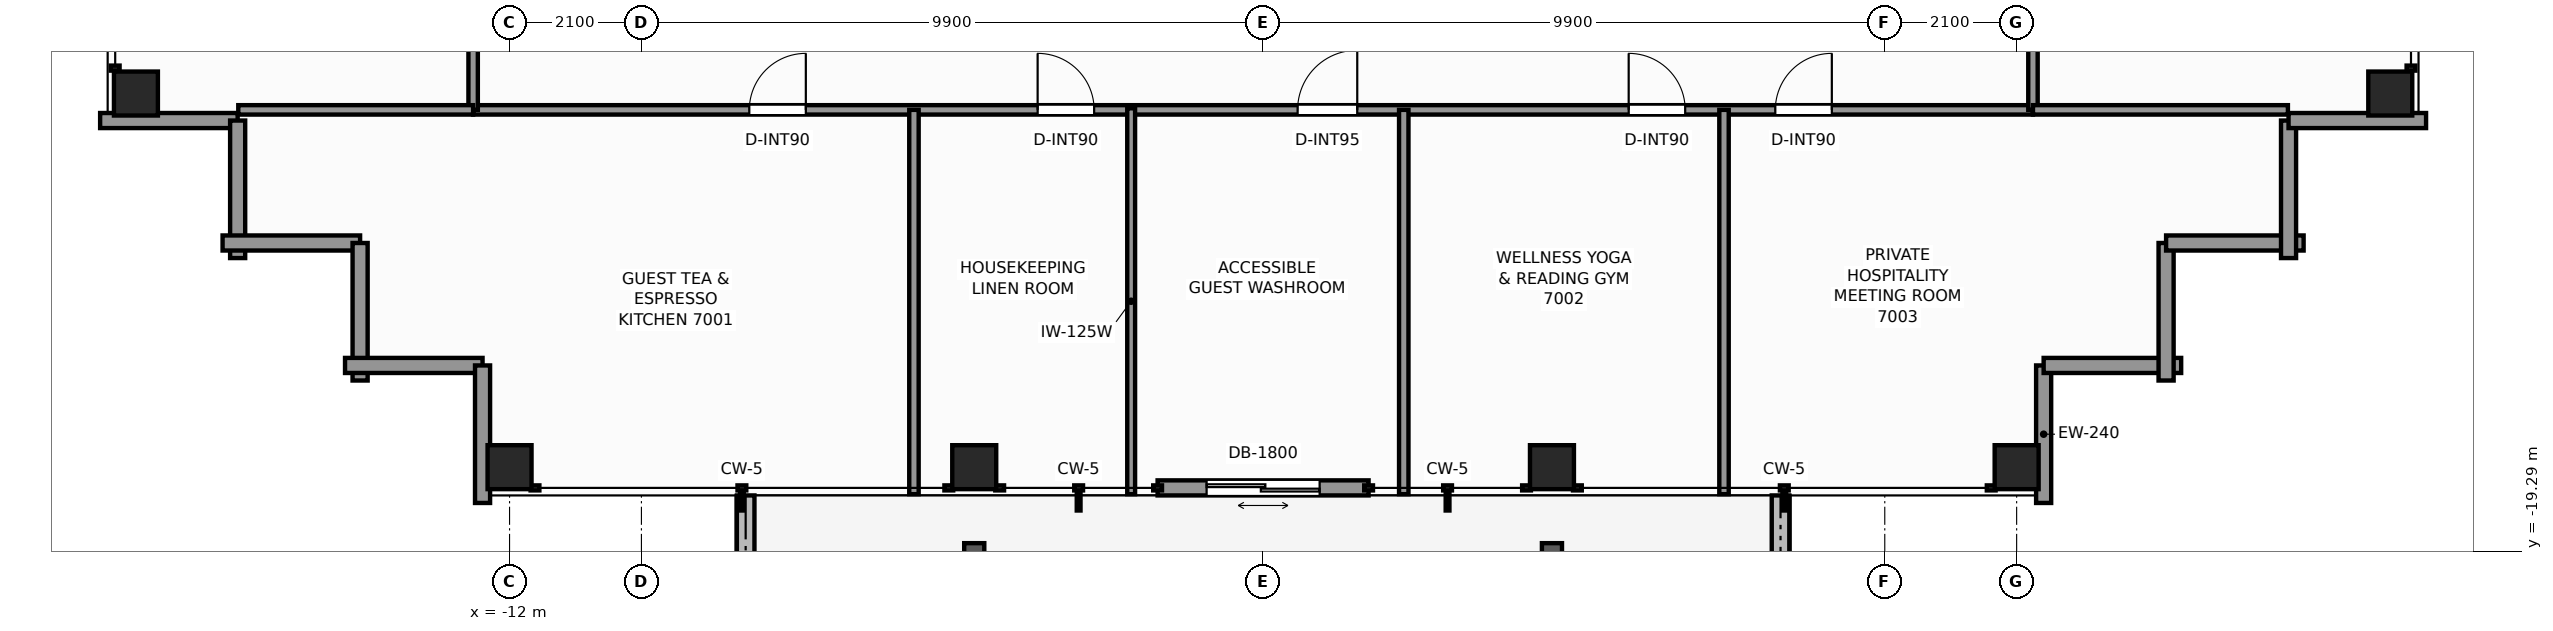
"""IFC4 building model, lengths in metres.
Left out: names, types, materials, properties, quantities, classifications, styles, units other than length and angle.
Written with IfcOpenShell. Run it as: python <this file> out.ifc"""

import sys

from ifc_helpers import new_model, si_unit, direction, frame, frame_2d, origin, origin_2d, place, context, subcontext, project, spatial, rectangle, extrude, element, fill, save


model = new_model("IFC4")
c1 = context("Model", 3, precision=1e-05, world=origin(), true_north=direction((0.0, 1.0)))
c2 = subcontext(c1, "Body", "Model", "MODEL_VIEW")
j1 = project(units=[si_unit("LENGTHUNIT", "METRE"), si_unit("PLANEANGLEUNIT", "RADIAN")], contexts=[c1])
p1 = place(None, origin())
s1 = spatial("IfcSite", under=j1, at=p1, CompositionType="ELEMENT")
p2 = place(p1, origin())
s2 = spatial("IfcBuilding", under=s1, at=p2, CompositionType="ELEMENT")
p3 = place(p2, frame((0.0, 0.0, 240.9)))
s3 = spatial("IfcBuildingStorey", under=s2, at=p3, CompositionType="ELEMENT", Elevation=240.9)
for number, where, z_axis, x_axis in (
    (1, (-12.0, -17.95, 0.0), (0.0, 0.0, 1.0), (1.0, 0.0, 0.0)),
    (2, (-4.6, -17.95, 0.0), (0.0, 0.0, 1.0), (1.0, 0.0, 0.0)),
    (3, (4.6, -17.95, 0.0), (0.0, 0.0, 1.0), (1.0, 0.0, 0.0)),
    (4, (12.0, -17.95, 0.0), (0.0, 0.0, 1.0), (1.0, 0.0, 0.0)),
    (5, (-17.95, -12.0, 0.0), (0.0, 0.0, 1.0), (1.0, 0.0, 0.0)),
    (6, (17.95, -12.0, 0.0), (0.0, 0.0, 1.0), (1.0, 0.0, 0.0)),
):
    element("IfcColumn", number, at=place(p3, frame(where, z_axis=z_axis, x_axis=x_axis)), inside=s3, PredefinedType="COLUMN", context=c2, shape_type="SweptSolid", body=[
        extrude(rectangle(XDim=0.7, YDim=0.7, at=origin_2d()), origin(), (0.0, 0.0, 1.0), 3.5),
    ])
p4 = place(p3, frame((8.24, -21.074, -0.07), z_axis=(0.0, 0.0, 1.0), x_axis=(0.0, 1.0, 0.0)))
e7 = element("IfcWall", 7, at=p4, inside=s3, PredefinedType="PARAPET", context=c2, shape_type="SweptSolid", body=[
    extrude(rectangle(XDim=2.674, YDim=0.28, at=frame_2d((1.337, 0.0))), origin(), (0.0, 0.0, 1.0), 0.42),
])
p5 = place(p3, frame((-8.24, -18.4, -0.07), z_axis=(0.0, 0.0, 1.0), x_axis=(0.0, -1.0, 0.0)))
e8 = element("IfcWall", 8, at=p5, inside=s3, PredefinedType="PARAPET", context=c2, shape_type="SweptSolid", body=[
    extrude(rectangle(XDim=3.42, YDim=0.28, at=frame_2d((1.71, 0.0))), origin(), (0.0, 0.0, 1.0), 0.42),
])
p6 = place(p3, frame((1.68, -18.28, 0.0), z_axis=(0.0, 0.0, 1.0), x_axis=(-1.0, 0.0, 0.0)))
e9 = element("IfcWall", 9, at=p6, inside=s3, PredefinedType="STANDARD", context=c2, shape_type="SweptSolid", body=[
    extrude(rectangle(XDim=3.36, YDim=0.24, at=frame_2d((1.68, 0.0))), origin(), (0.0, 0.0, 1.0), 3.25),
])
p7 = place(p6, frame((0.78, 0.0, 0.0)))
e10 = element("IfcOpeningElement", 10, at=p7, cuts=e9, PredefinedType="OPENING", context=c2, shape_type="SweptSolid", body=[
    extrude(rectangle(XDim=1.8, YDim=2.2, at=frame_2d((0.9, 1.1))), frame((0.0, 0.13, 0.0), z_axis=(0.0, -1.0, 0.0), x_axis=(1.0, 0.0, 0.0)), (0.0, 0.0, 1.0), 0.26),
])
p8 = place(p3, frame((12.43, -16.33, 0.0), z_axis=(0.0, 0.0, 1.0), x_axis=(0.0, -1.0, 0.0)))
e11 = element("IfcWall", 11, at=p8, inside=s3, PredefinedType="STANDARD", context=c2, shape_type="SweptSolid", body=[
    extrude(rectangle(XDim=2.19, YDim=0.24, at=frame_2d((1.095, 0.0))), origin(), (0.0, 0.0, 1.0), 2.633),
])
for number, where, z_axis, x_axis in (
    (12, (14.62, -16.33, 0.0), (0.0, 0.0, 1.0), (-1.0, 0.0, 0.0)),
    (13, (14.38, -14.38, 0.0), (0.0, 0.0, 1.0), (0.0, -1.0, 0.0)),
    (14, (16.57, -14.38, 0.0), (0.0, 0.0, 1.0), (-1.0, 0.0, 0.0)),
    (15, (16.33, -12.43, 0.0), (0.0, 0.0, 1.0), (0.0, -1.0, 0.0)),
):
    element("IfcWall", number, at=place(p3, frame(where, z_axis=z_axis, x_axis=x_axis)), inside=s3, PredefinedType="STANDARD", context=c2, shape_type="SweptSolid", body=[
        extrude(rectangle(XDim=2.19, YDim=0.24, at=frame_2d((1.095, 0.0))), origin(), (0.0, 0.0, 1.0), 2.633),
    ])
for number, where, z_axis, x_axis in (
    (16, (18.52, -12.43, 0.0), (0.0, 0.0, 1.0), (-1.0, 0.0, 0.0)),
    (17, (-16.33, -12.43, 0.0), (0.0, 0.0, 1.0), (-1.0, 0.0, 0.0)),
):
    element("IfcWall", number, at=place(p3, frame(where, z_axis=z_axis, x_axis=x_axis)), inside=s3, PredefinedType="STANDARD", context=c2, shape_type="SweptSolid", body=[
        extrude(rectangle(XDim=2.19, YDim=0.24, at=frame_2d((1.095, 0.0))), origin(), (0.0, 0.0, 1.0), 2.633),
    ])
for number, where, z_axis, x_axis in (
    (18, (-16.33, -14.62, 0.0), (0.0, 0.0, 1.0), (0.0, 1.0, 0.0)),
    (19, (-14.38, -14.38, 0.0), (0.0, 0.0, 1.0), (-1.0, 0.0, 0.0)),
    (20, (-14.38, -16.57, 0.0), (0.0, 0.0, 1.0), (0.0, 1.0, 0.0)),
    (21, (-12.43, -16.33, 0.0), (0.0, 0.0, 1.0), (-1.0, 0.0, 0.0)),
):
    element("IfcWall", number, at=place(p3, frame(where, z_axis=z_axis, x_axis=x_axis)), inside=s3, PredefinedType="STANDARD", context=c2, shape_type="SweptSolid", body=[
        extrude(rectangle(XDim=2.19, YDim=0.24, at=frame_2d((1.095, 0.0))), origin(), (0.0, 0.0, 1.0), 2.633),
    ])
p9 = place(p3, frame((-12.43, -18.52, 0.0), z_axis=(0.0, 0.0, 1.0), x_axis=(0.0, 1.0, 0.0)))
e22 = element("IfcWall", 22, at=p9, inside=s3, PredefinedType="STANDARD", context=c2, shape_type="SweptSolid", body=[
    extrude(rectangle(XDim=2.19, YDim=0.24, at=frame_2d((1.095, 0.0))), origin(), (0.0, 0.0, 1.0), 2.633),
])
p10 = place(p3, frame((-12.58, -12.26, 0.0), z_axis=(0.0, 0.0, 1.0), x_axis=(1.0, 0.0, 0.0)))
e23 = element("IfcWall", 23, at=p10, inside=s3, PredefinedType="PARTITIONING", context=c2, shape_type="SweptSolid", body=[
    extrude(rectangle(XDim=24.84, YDim=0.15, at=frame_2d((12.42, 0.0))), origin(), (0.0, 0.0, 1.0), 2.539),
])
p11 = place(p10, frame((4.398, 0.0, 0.0)))
e24 = element("IfcOpeningElement", 24, at=p11, cuts=e23, PredefinedType="OPENING", context=c2, shape_type="SweptSolid", body=[
    extrude(rectangle(XDim=0.9, YDim=2.06, at=frame_2d((0.45, 1.03))), frame((0.0, 0.085, 0.0), z_axis=(0.0, -1.0, 0.0), x_axis=(1.0, 0.0, 0.0)), (0.0, 0.0, 1.0), 0.17),
])
p12 = place(p10, frame((8.99, 0.0, 0.0)))
e25 = element("IfcOpeningElement", 25, at=p12, cuts=e23, PredefinedType="OPENING", context=c2, shape_type="SweptSolid", body=[
    extrude(rectangle(XDim=0.9, YDim=2.06, at=frame_2d((0.45, 1.03))), frame((0.0, 0.085, 0.0), z_axis=(0.0, -1.0, 0.0), x_axis=(1.0, 0.0, 0.0)), (0.0, 0.0, 1.0), 0.17),
])
p13 = place(p10, frame((13.129, 0.0, 0.0)))
e26 = element("IfcOpeningElement", 26, at=p13, cuts=e23, PredefinedType="OPENING", context=c2, shape_type="SweptSolid", body=[
    extrude(rectangle(XDim=0.95, YDim=2.06, at=frame_2d((0.475, 1.03))), frame((0.0, 0.085, 0.0), z_axis=(0.0, -1.0, 0.0), x_axis=(1.0, 0.0, 0.0)), (0.0, 0.0, 1.0), 0.17),
])
p14 = place(p10, frame((18.402, 0.0, 0.0)))
e27 = element("IfcOpeningElement", 27, at=p14, cuts=e23, PredefinedType="OPENING", context=c2, shape_type="SweptSolid", body=[
    extrude(rectangle(XDim=0.9, YDim=2.06, at=frame_2d((0.45, 1.03))), frame((0.0, 0.085, 0.0), z_axis=(0.0, -1.0, 0.0), x_axis=(1.0, 0.0, 0.0)), (0.0, 0.0, 1.0), 0.17),
])
p15 = place(p10, frame((20.737, 0.0, 0.0)))
e28 = element("IfcOpeningElement", 28, at=p15, cuts=e23, PredefinedType="OPENING", context=c2, shape_type="SweptSolid", body=[
    extrude(rectangle(XDim=0.9, YDim=2.06, at=frame_2d((0.45, 1.03))), frame((0.0, 0.085, 0.0), z_axis=(0.0, -1.0, 0.0), x_axis=(1.0, 0.0, 0.0)), (0.0, 0.0, 1.0), 0.17),
])
p16 = place(p3, frame((-12.58, -12.26, 0.0), z_axis=(0.0, 0.0, 1.0), x_axis=(0.0, 1.0, 0.0)))
e29 = element("IfcWall", 29, at=p16, inside=s3, PredefinedType="PARTITIONING", context=c2, shape_type="SweptSolid", body=[
    extrude(rectangle(XDim=24.84, YDim=0.15, at=frame_2d((12.42, 0.0))), origin(), (0.0, 0.0, 1.0), 2.539),
])
p17 = place(p16, frame((2.686, 0.0, 0.0)))
e30 = element("IfcOpeningElement", 30, at=p17, cuts=e29, PredefinedType="OPENING", context=c2, shape_type="SweptSolid", body=[
    extrude(rectangle(XDim=0.9, YDim=2.06, at=frame_2d((0.45, 1.03))), frame((0.0, 0.085, 0.0), z_axis=(0.0, -1.0, 0.0), x_axis=(1.0, 0.0, 0.0)), (0.0, 0.0, 1.0), 0.17),
])
p18 = place(p16, frame((4.385, 0.0, 0.0)))
e31 = element("IfcOpeningElement", 31, at=p18, cuts=e29, PredefinedType="OPENING", context=c2, shape_type="SweptSolid", body=[
    extrude(rectangle(XDim=0.95, YDim=2.06, at=frame_2d((0.475, 1.03))), frame((0.0, 0.085, 0.0), z_axis=(0.0, -1.0, 0.0), x_axis=(1.0, 0.0, 0.0)), (0.0, 0.0, 1.0), 0.17),
])
p19 = place(p16, frame((13.796, 0.0, 0.0)))
e32 = element("IfcOpeningElement", 32, at=p19, cuts=e29, PredefinedType="OPENING", context=c2, shape_type="SweptSolid", body=[
    extrude(rectangle(XDim=0.95, YDim=2.06, at=frame_2d((0.475, 1.03))), frame((0.0, 0.085, 0.0), z_axis=(0.0, -1.0, 0.0), x_axis=(1.0, 0.0, 0.0)), (0.0, 0.0, 1.0), 0.17),
])
p20 = place(p16, frame((18.242, 0.0, 0.0)))
e33 = element("IfcOpeningElement", 33, at=p20, cuts=e29, PredefinedType="OPENING", context=c2, shape_type="SweptSolid", body=[
    extrude(rectangle(XDim=0.9, YDim=2.06, at=frame_2d((0.45, 1.03))), frame((0.0, 0.085, 0.0), z_axis=(0.0, -1.0, 0.0), x_axis=(1.0, 0.0, 0.0)), (0.0, 0.0, 1.0), 0.17),
])
p21 = place(p16, frame((20.059, 0.0, 0.0)))
e34 = element("IfcOpeningElement", 34, at=p21, cuts=e29, PredefinedType="OPENING", context=c2, shape_type="SweptSolid", body=[
    extrude(rectangle(XDim=0.95, YDim=2.06, at=frame_2d((0.475, 1.03))), frame((0.0, 0.085, 0.0), z_axis=(0.0, -1.0, 0.0), x_axis=(1.0, 0.0, 0.0)), (0.0, 0.0, 1.0), 0.17),
])
p22 = place(p3, frame((12.26, -12.26, 0.0), z_axis=(0.0, 0.0, 1.0), x_axis=(0.0, 1.0, 0.0)))
e35 = element("IfcWall", 35, at=p22, inside=s3, PredefinedType="PARTITIONING", context=c2, shape_type="SweptSolid", body=[
    extrude(rectangle(XDim=24.84, YDim=0.15, at=frame_2d((12.42, 0.0))), origin(), (0.0, 0.0, 1.0), 2.539),
])
p23 = place(p22, frame((4.275, 0.0, 0.0)))
e36 = element("IfcOpeningElement", 36, at=p23, cuts=e35, PredefinedType="OPENING", context=c2, shape_type="SweptSolid", body=[
    extrude(rectangle(XDim=0.9, YDim=2.06, at=frame_2d((0.45, 1.03))), frame((0.0, 0.085, 0.0), z_axis=(0.0, -1.0, 0.0), x_axis=(1.0, 0.0, 0.0)), (0.0, 0.0, 1.0), 0.17),
])
p24 = place(p22, frame((9.966, 0.0, 0.0)))
e37 = element("IfcOpeningElement", 37, at=p24, cuts=e35, PredefinedType="OPENING", context=c2, shape_type="SweptSolid", body=[
    extrude(rectangle(XDim=0.95, YDim=2.06, at=frame_2d((0.475, 1.03))), frame((0.0, 0.085, 0.0), z_axis=(0.0, -1.0, 0.0), x_axis=(1.0, 0.0, 0.0)), (0.0, 0.0, 1.0), 0.17),
])
p25 = place(p22, frame((18.653, 0.0, 0.0)))
e38 = element("IfcOpeningElement", 38, at=p25, cuts=e35, PredefinedType="OPENING", context=c2, shape_type="SweptSolid", body=[
    extrude(rectangle(XDim=0.95, YDim=2.06, at=frame_2d((0.475, 1.03))), frame((0.0, 0.085, 0.0), z_axis=(0.0, -1.0, 0.0), x_axis=(1.0, 0.0, 0.0)), (0.0, 0.0, 1.0), 0.17),
])
p26 = place(p22, frame((20.836, 0.0, 0.0)))
e39 = element("IfcOpeningElement", 39, at=p26, cuts=e35, PredefinedType="OPENING", context=c2, shape_type="SweptSolid", body=[
    extrude(rectangle(XDim=0.9, YDim=2.06, at=frame_2d((0.45, 1.03))), frame((0.0, 0.085, 0.0), z_axis=(0.0, -1.0, 0.0), x_axis=(1.0, 0.0, 0.0)), (0.0, 0.0, 1.0), 0.17),
])
p27 = place(p3, frame((-16.32, -12.26, 0.0), z_axis=(0.0, 0.0, 1.0), x_axis=(1.0, 0.0, 0.0)))
e40 = element("IfcWall", 40, at=p27, inside=s3, PredefinedType="PARTITIONING", context=c2, shape_type="SweptSolid", body=[
    extrude(rectangle(XDim=3.74, YDim=0.15, at=frame_2d((1.87, 0.0))), origin(), (0.0, 0.0, 1.0), 3.25),
])
p28 = place(p3, frame((12.26, -12.26, 0.0), z_axis=(0.0, 0.0, 1.0), x_axis=(1.0, 0.0, 0.0)))
e41 = element("IfcWall", 41, at=p28, inside=s3, PredefinedType="PARTITIONING", context=c2, shape_type="SweptSolid", body=[
    extrude(rectangle(XDim=4.06, YDim=0.15, at=frame_2d((2.03, 0.0))), origin(), (0.0, 0.0, 1.0), 3.25),
])
for number, where, z_axis, x_axis in (
    (42, (-5.56, -18.38, 0.0), (0.0, 0.0, 1.0), (0.0, 1.0, 0.0)),
    (43, (2.24, -18.38, 0.0), (0.0, 0.0, 1.0), (0.0, 1.0, 0.0)),
):
    element("IfcWall", number, at=place(p3, frame(where, z_axis=z_axis, x_axis=x_axis)), inside=s3, PredefinedType="PARTITIONING", context=c2, shape_type="SweptSolid", body=[
        extrude(rectangle(XDim=6.12, YDim=0.15, at=frame_2d((3.06, 0.0))), origin(), (0.0, 0.0, 1.0), 2.623),
    ])
p29 = place(p3, frame((-2.101, -18.38, 0.0), z_axis=(0.0, 0.0, 1.0), x_axis=(0.0, 1.0, 0.0)))
e44 = element("IfcWall", 44, at=p29, inside=s3, PredefinedType="PARTITIONING", context=c2, shape_type="SweptSolid", body=[
    extrude(rectangle(XDim=6.145, YDim=0.125, at=frame_2d((3.072, 0.0))), origin(), (0.0, 0.0, 1.0), 2.623),
])
p30 = place(p3, frame((7.34, -18.38, 0.0), z_axis=(0.0, 0.0, 1.0), x_axis=(0.0, 1.0, 0.0)))
e45 = element("IfcWall", 45, at=p30, inside=s3, PredefinedType="PARTITIONING", context=c2, shape_type="SweptSolid", body=[
    extrude(rectangle(XDim=6.12, YDim=0.15, at=frame_2d((3.06, 0.0))), origin(), (0.0, 0.0, 1.0), 2.623),
])
p31 = place(p7, origin())
e46 = element("IfcDoor", 46, at=p31, inside=s3, OperationType="DOUBLE_DOOR_SLIDING", PredefinedType="DOOR", context=c2, shape_type="SweptSolid", body=[
    extrude(rectangle(XDim=1.8, YDim=2.2, at=frame_2d((0.9, 1.1))), frame((0.0, 0.025, 0.0), z_axis=(0.0, -1.0, 0.0), x_axis=(1.0, 0.0, 0.0)), (0.0, 0.0, 1.0), 0.05),
])
fill(e10, e46)
p32 = place(p11, origin())
e47 = element("IfcDoor", 47, at=p32, inside=s3, OperationType="SINGLE_SWING_RIGHT", PredefinedType="DOOR", context=c2, shape_type="SweptSolid", body=[
    extrude(rectangle(XDim=0.9, YDim=2.06, at=frame_2d((0.45, 1.03))), frame((0.0, 0.025, 0.0), z_axis=(0.0, -1.0, 0.0), x_axis=(1.0, 0.0, 0.0)), (0.0, 0.0, 1.0), 0.05),
])
fill(e24, e47)
p33 = place(p12, origin())
e48 = element("IfcDoor", 48, at=p33, inside=s3, OperationType="SINGLE_SWING_LEFT", PredefinedType="DOOR", context=c2, shape_type="SweptSolid", body=[
    extrude(rectangle(XDim=0.9, YDim=2.06, at=frame_2d((0.45, 1.03))), frame((0.0, 0.025, 0.0), z_axis=(0.0, -1.0, 0.0), x_axis=(1.0, 0.0, 0.0)), (0.0, 0.0, 1.0), 0.05),
])
fill(e25, e48)
p34 = place(p13, origin())
e49 = element("IfcDoor", 49, at=p34, inside=s3, OperationType="SINGLE_SWING_RIGHT", PredefinedType="DOOR", context=c2, shape_type="SweptSolid", body=[
    extrude(rectangle(XDim=0.95, YDim=2.06, at=frame_2d((0.475, 1.03))), frame((0.0, 0.025, 0.0), z_axis=(0.0, -1.0, 0.0), x_axis=(1.0, 0.0, 0.0)), (0.0, 0.0, 1.0), 0.05),
])
fill(e26, e49)
p35 = place(p14, origin())
e50 = element("IfcDoor", 50, at=p35, inside=s3, OperationType="SINGLE_SWING_LEFT", PredefinedType="DOOR", context=c2, shape_type="SweptSolid", body=[
    extrude(rectangle(XDim=0.9, YDim=2.06, at=frame_2d((0.45, 1.03))), frame((0.0, 0.025, 0.0), z_axis=(0.0, -1.0, 0.0), x_axis=(1.0, 0.0, 0.0)), (0.0, 0.0, 1.0), 0.05),
])
fill(e27, e50)
p36 = place(p15, origin())
e51 = element("IfcDoor", 51, at=p36, inside=s3, OperationType="SINGLE_SWING_RIGHT", PredefinedType="DOOR", context=c2, shape_type="SweptSolid", body=[
    extrude(rectangle(XDim=0.9, YDim=2.06, at=frame_2d((0.45, 1.03))), frame((0.0, 0.025, 0.0), z_axis=(0.0, -1.0, 0.0), x_axis=(1.0, 0.0, 0.0)), (0.0, 0.0, 1.0), 0.05),
])
fill(e28, e51)
save(model, sys.argv[1])
